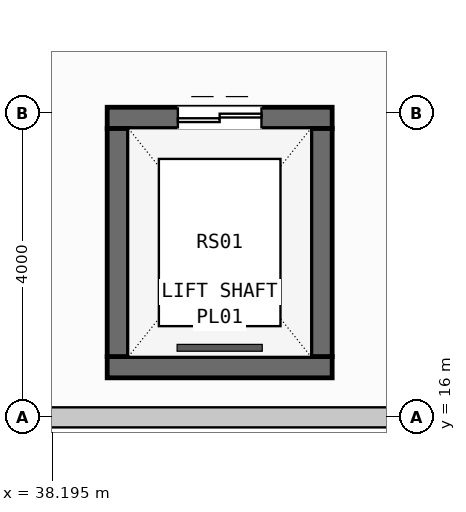
"""IFC4 building model, lengths in metres.
Left out: names, types, materials, properties, quantities, classifications, styles, units other than length and angle.
Written with IfcOpenShell. Run it as: python <this file> out.ifc"""

import sys

from ifc_helpers import new_model, si_unit, direction, frame, frame_2d, origin, place, context, subcontext, project, spatial, rectangle, extrude, element, fill, save


model = new_model("IFC4")
c1 = context("Model", 3, precision=1e-05, world=origin(), true_north=direction((0.0, 1.0)))
c2 = subcontext(c1, "Body", "Model", "MODEL_VIEW")
j1 = project(units=[si_unit("LENGTHUNIT", "METRE"), si_unit("PLANEANGLEUNIT", "RADIAN")], contexts=[c1])
p1 = place(None, origin())
s1 = spatial("IfcSite", under=j1, at=p1, CompositionType="ELEMENT")
p2 = place(p1, origin())
s2 = spatial("IfcBuilding", under=s1, at=p2, CompositionType="ELEMENT")
p3 = place(p2, frame((0.0, 0.0, 11.4)))
s3 = spatial("IfcBuildingStorey", under=s2, at=p3, CompositionType="ELEMENT", Elevation=11.4)
p4 = place(p3, frame((38.92, 16.66, 0.0), z_axis=(0.0, 0.0, 1.0), x_axis=(1.0, 0.0, 0.0)))
e1 = element("IfcWall", 1, at=p4, inside=s3, PredefinedType="SHEAR", context=c2, shape_type="SweptSolid", body=[
    extrude(rectangle(XDim=2.96, YDim=0.28, at=frame_2d((1.48, 0.0))), origin(), (0.0, 0.0, 1.0), 4.2),
])
p5 = place(p3, frame((38.92, 19.94, 0.0), z_axis=(0.0, 0.0, 1.0), x_axis=(1.0, 0.0, 0.0)))
e2 = element("IfcWall", 2, at=p5, inside=s3, PredefinedType="SHEAR", context=c2, shape_type="SweptSolid", body=[
    extrude(rectangle(XDim=2.96, YDim=0.28, at=frame_2d((1.48, 0.0))), origin(), (0.0, 0.0, 1.0), 4.2),
])
p6 = place(p5, frame((0.93, 0.0, 0.0)))
e3 = element("IfcOpeningElement", 3, at=p6, cuts=e2, PredefinedType="OPENING", context=c2, shape_type="SweptSolid", body=[
    extrude(rectangle(XDim=1.1, YDim=2.15, at=frame_2d((0.55, 1.075))), frame((0.0, 0.15, 0.0), z_axis=(0.0, -1.0, 0.0), x_axis=(1.0, 0.0, 0.0)), (0.0, 0.0, 1.0), 0.3),
])
for number, where, z_axis, x_axis in (
    (4, (39.06, 16.8, 0.0), (0.0, 0.0, 1.0), (0.0, 1.0, 0.0)),
    (5, (41.74, 16.8, 0.0), (0.0, 0.0, 1.0), (0.0, 1.0, 0.0)),
):
    element("IfcWall", number, at=place(p3, frame(where, z_axis=z_axis, x_axis=x_axis)), inside=s3, PredefinedType="SHEAR", context=c2, shape_type="SweptSolid", body=[
        extrude(rectangle(XDim=3.0, YDim=0.28, at=frame_2d((1.5, 0.0))), origin(), (0.0, 0.0, 1.0), 4.2),
    ])
p7 = place(p3, frame((38.146, 16.0, 0.0), z_axis=(0.0, 0.0, 1.0), x_axis=(1.0, 0.0, 0.0)))
e6 = element("IfcWall", 6, at=p7, inside=s3, PredefinedType="STANDARD", context=c2, shape_type="SweptSolid", body=[
    extrude(rectangle(XDim=8.708, YDim=0.264, at=frame_2d((4.354, 0.0))), origin(), (0.0, 0.0, 1.0), 4.438),
])
p8 = place(p6, origin())
e7 = element("IfcDoor", 7, at=p8, inside=s3, OperationType="DOUBLE_DOOR_SLIDING", PredefinedType="DOOR", context=c2, shape_type="SweptSolid", body=[
    extrude(rectangle(XDim=1.1, YDim=2.15, at=frame_2d((0.55, 1.075))), frame((0.0, 0.025, 0.0), z_axis=(0.0, -1.0, 0.0), x_axis=(1.0, 0.0, 0.0)), (0.0, 0.0, 1.0), 0.05),
])
fill(e3, e7)
save(model, sys.argv[1])
